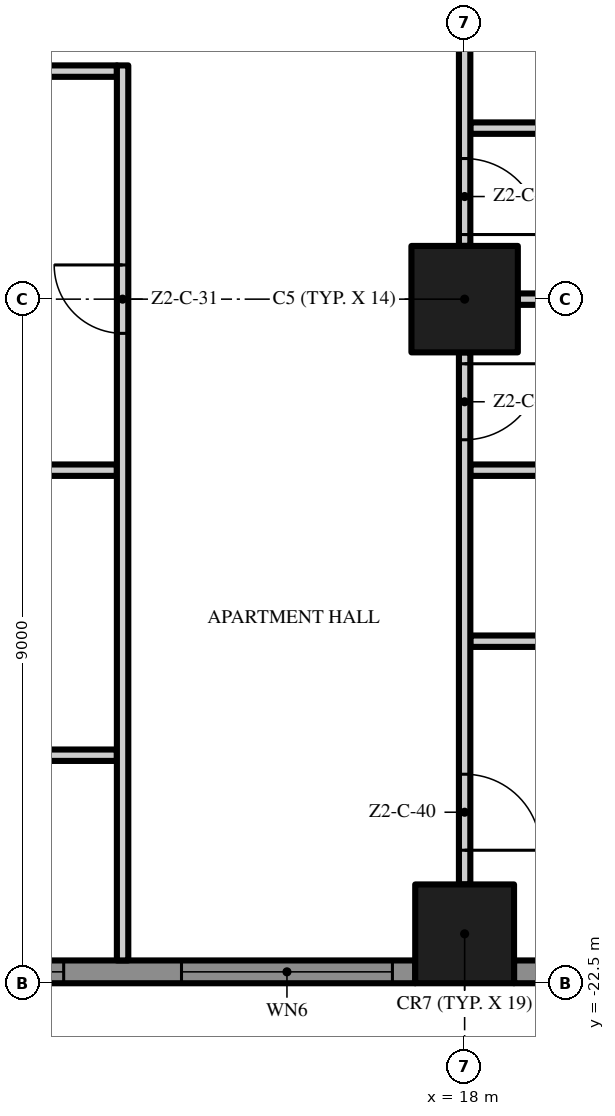
"""IFC4 building model, lengths in metres.
Left out: names, types, materials, properties, quantities, classifications, styles, units other than length and angle.
Written with IfcOpenShell. Run it as: python <this file> out.ifc"""

import sys

from ifc_helpers import new_model, si_unit, direction, frame, frame_2d, origin, origin_2d, place, context, subcontext, project, spatial, polyline, rectangle, outline, extrude, element, fill, save


model = new_model("IFC4")
c1 = context("Model", 3, precision=1e-05, world=origin(), true_north=direction((0.0, 1.0)))
c2 = subcontext(c1, "Body", "Model", "MODEL_VIEW")
j1 = project(units=[si_unit("LENGTHUNIT", "METRE"), si_unit("PLANEANGLEUNIT", "RADIAN")], contexts=[c1])
p1 = place(None, origin())
s1 = spatial("IfcSite", under=j1, at=p1, CompositionType="ELEMENT")
p2 = place(p1, origin())
s2 = spatial("IfcBuilding", under=s1, at=p2, CompositionType="ELEMENT")
p3 = place(p2, frame((0.0, 0.0, 92.2)))
s3 = spatial("IfcBuildingStorey", under=s2, at=p3, CompositionType="ELEMENT", Elevation=92.2)
p4 = place(p3, frame((18.0, -13.5, 0.0), z_axis=(0.0, 0.0, 1.0), x_axis=(1.0, 0.0, 0.0)))
e1 = element("IfcColumn", 1, at=p4, inside=s3, PredefinedType="COLUMN", context=c2, shape_type="SweptSolid", body=[
    extrude(rectangle(XDim=1.4, YDim=1.4, at=origin_2d()), origin(), (0.0, 0.0, 1.0), 3.5),
])
p5 = place(p3, frame((18.0, -21.85, 0.0), z_axis=(0.0, 0.0, 1.0), x_axis=(1.0, 0.0, 0.0)))
e2 = element("IfcColumn", 2, at=p5, inside=s3, PredefinedType="COLUMN", context=c2, shape_type="SweptSolid", body=[
    extrude(rectangle(XDim=1.3, YDim=1.3, at=origin_2d()), origin(), (0.0, 0.0, 1.0), 3.5),
])
p6 = place(p3, frame((17.35, -22.35, 0.0), z_axis=(0.0, 0.0, 1.0), x_axis=(-1.0, 0.0, 0.0)))
e3 = element("IfcWall", 3, at=p6, inside=s3, PredefinedType="SOLIDWALL", context=c2, shape_type="SweptSolid", body=[
    extrude(rectangle(XDim=7.7, YDim=0.3, at=frame_2d((3.85, 0.0))), origin(), (0.0, 0.0, 1.0), 3.5),
])
p7 = place(p6, frame((4.625, 0.0, 0.45)))
e4 = element("IfcOpeningElement", 4, at=p7, cuts=e3, PredefinedType="OPENING", context=c2, shape_type="SweptSolid", body=[
    extrude(rectangle(XDim=2.775, YDim=2.65, at=frame_2d((1.387, 1.325))), frame((0.0, 0.16, 0.0), z_axis=(0.0, -1.0, 0.0), x_axis=(1.0, 0.0, 0.0)), (0.0, 0.0, 1.0), 0.32),
])
p8 = place(p6, frame((0.3, 0.0, 0.45)))
e5 = element("IfcOpeningElement", 5, at=p8, cuts=e3, PredefinedType="OPENING", context=c2, shape_type="SweptSolid", body=[
    extrude(rectangle(XDim=2.775, YDim=2.65, at=frame_2d((1.387, 1.325))), frame((0.0, 0.16, 0.0), z_axis=(0.0, -1.0, 0.0), x_axis=(1.0, 0.0, 0.0)), (0.0, 0.0, 1.0), 0.32),
])
p9 = place(p3, frame((22.5, -22.35, 0.0), z_axis=(0.0, 0.0, 1.0), x_axis=(-1.0, 0.0, 0.0)))
e6 = element("IfcWall", 6, at=p9, inside=s3, PredefinedType="SOLIDWALL", context=c2, shape_type="SweptSolid", body=[
    extrude(rectangle(XDim=3.85, YDim=0.3, at=frame_2d((1.925, 0.0))), origin(), (0.0, 0.0, 1.0), 3.5),
])
p10 = place(p9, frame((0.775, 0.0, 0.0)))
e7 = element("IfcOpeningElement", 7, at=p10, cuts=e6, PredefinedType="OPENING", context=c2, shape_type="SweptSolid", body=[
    extrude(rectangle(XDim=2.775, YDim=2.4, at=frame_2d((1.387, 1.2))), frame((0.0, 0.16, 0.0), z_axis=(0.0, -1.0, 0.0), x_axis=(1.0, 0.0, 0.0)), (0.0, 0.0, 1.0), 0.32),
])
p11 = place(p3, origin())
e8 = element("IfcWall", 8, at=p11, inside=s3, PredefinedType="USERDEFINED", context=c2, shape_type="SweptSolid", body=[
    extrude(outline(polyline([(-22.5, -24.3), (-21.0, -23.595), (-19.5, -23.159), (-18.75, -23.1), (-18.0, -23.159), (-16.5, -23.595), (-15.0, -24.3), (-13.5, -25.005), (-12.0, -25.441), (-11.25, -25.5), (-10.5, -25.441), (-9.0, -25.005), (-7.5, -24.3), (-6.0, -23.595), (-4.5, -23.159), (-3.75, -23.1), (-3.0, -23.159), (-1.5, -23.595), (0.0, -24.3), (1.5, -25.005), (3.0, -25.441), (3.75, -25.5), (4.5, -25.441), (6.0, -25.005), (7.5, -24.3), (9.0, -23.595), (10.5, -23.159), (11.25, -23.1), (12.0, -23.159), (13.5, -23.595), (15.0, -24.3), (16.5, -25.005), (18.0, -25.441), (18.75, -25.5), (19.5, -25.441), (21.0, -25.005), (22.5, -24.3), (22.394, -24.074), (20.911, -24.771), (19.455, -25.194), (18.75, -25.249), (18.045, -25.194), (16.589, -24.771), (15.106, -24.074), (13.589, -23.36), (12.045, -22.911), (11.25, -22.849), (10.455, -22.911), (8.911, -23.36), (7.394, -24.074), (5.911, -24.771), (4.455, -25.194), (3.75, -25.249), (3.045, -25.194), (1.589, -24.771), (0.106, -24.074), (-1.411, -23.36), (-2.955, -22.911), (-3.75, -22.849), (-4.545, -22.911), (-6.089, -23.36), (-7.606, -24.074), (-9.089, -24.771), (-10.545, -25.194), (-11.25, -25.249), (-11.955, -25.194), (-13.411, -24.771), (-14.894, -24.074), (-16.411, -23.36), (-17.955, -22.911), (-18.75, -22.849), (-19.545, -22.911), (-21.089, -23.36), (-22.606, -24.074), (-22.5, -24.3)])), origin(), (0.0, 0.0, 1.0), 0.9),
])
p12 = place(p3, frame((9.075, -19.5, 0.0), z_axis=(0.0, 0.0, 1.0), x_axis=(1.0, 0.0, 0.0)))
e9 = element("IfcWall", 9, at=p12, inside=s3, PredefinedType="PARTITIONING", context=c2, shape_type="SweptSolid", body=[
    extrude(rectangle(XDim=4.35, YDim=0.15, at=frame_2d((2.175, 0.0))), origin(), (0.0, 0.0, 1.0), 3.5),
])
p13 = place(p3, frame((18.075, -18.0, 0.0), z_axis=(0.0, 0.0, 1.0), x_axis=(1.0, 0.0, 0.0)))
e10 = element("IfcWall", 10, at=p13, inside=s3, PredefinedType="PARTITIONING", context=c2, shape_type="SweptSolid", body=[
    extrude(rectangle(XDim=3.775, YDim=0.15, at=frame_2d((1.887, 0.0))), origin(), (0.0, 0.0, 1.0), 3.5),
])
p14 = place(p3, frame((13.425, -15.75, 0.0), z_axis=(0.0, 0.0, 1.0), x_axis=(-1.0, 0.0, 0.0)))
e11 = element("IfcWall", 11, at=p14, inside=s3, PredefinedType="PARTITIONING", context=c2, shape_type="SweptSolid", body=[
    extrude(rectangle(XDim=4.35, YDim=0.15, at=frame_2d((2.175, 0.0))), origin(), (0.0, 0.0, 1.0), 3.5),
])
p15 = place(p14, frame((1.7, 0.0, 0.0)))
e12 = element("IfcOpeningElement", 12, at=p15, cuts=e11, PredefinedType="OPENING", context=c2, shape_type="SweptSolid", body=[
    extrude(rectangle(XDim=0.9, YDim=2.1, at=frame_2d((0.45, 1.05))), frame((0.0, 0.085, 0.0), z_axis=(0.0, -1.0, 0.0), x_axis=(1.0, 0.0, 0.0)), (0.0, 0.0, 1.0), 0.17),
])
p16 = place(p3, frame((18.075, -15.75, 0.0), z_axis=(0.0, 0.0, 1.0), x_axis=(1.0, 0.0, 0.0)))
e13 = element("IfcWall", 13, at=p16, inside=s3, PredefinedType="PARTITIONING", context=c2, shape_type="SweptSolid", body=[
    extrude(rectangle(XDim=2.85, YDim=0.15, at=frame_2d((1.425, 0.0))), origin(), (0.0, 0.0, 1.0), 3.5),
])
p17 = place(p3, frame((18.7, -13.5, 0.0), z_axis=(0.0, 0.0, 1.0), x_axis=(1.0, 0.0, 0.0)))
e14 = element("IfcWall", 14, at=p17, inside=s3, PredefinedType="PARTITIONING", context=c2, shape_type="SweptSolid", body=[
    extrude(rectangle(XDim=7.0, YDim=0.15, at=frame_2d((3.5, 0.0))), origin(), (0.0, 0.0, 1.0), 3.5),
])
p18 = place(p3, frame((18.075, -11.25, 0.0), z_axis=(0.0, 0.0, 1.0), x_axis=(1.0, 0.0, 0.0)))
e15 = element("IfcWall", 15, at=p18, inside=s3, PredefinedType="PARTITIONING", context=c2, shape_type="SweptSolid", body=[
    extrude(rectangle(XDim=2.85, YDim=0.15, at=frame_2d((1.425, 0.0))), origin(), (0.0, 0.0, 1.0), 3.5),
])
p19 = place(p3, frame((9.075, -10.5, 0.0), z_axis=(0.0, 0.0, 1.0), x_axis=(1.0, 0.0, 0.0)))
e16 = element("IfcWall", 16, at=p19, inside=s3, PredefinedType="PARTITIONING", context=c2, shape_type="SweptSolid", body=[
    extrude(rectangle(XDim=4.35, YDim=0.15, at=frame_2d((2.175, 0.0))), origin(), (0.0, 0.0, 1.0), 3.5),
])
p20 = place(p3, frame((13.5, -22.2, 0.0), z_axis=(0.0, 0.0, 1.0), x_axis=(0.0, 1.0, 0.0)))
e17 = element("IfcWall", 17, at=p20, inside=s3, PredefinedType="PARTITIONING", context=c2, shape_type="SweptSolid", body=[
    extrude(rectangle(XDim=11.775, YDim=0.15, at=frame_2d((5.888, 0.0))), origin(), (0.0, 0.0, 1.0), 3.5),
])
p21 = place(p20, frame((8.25, 0.0, 0.0)))
e18 = element("IfcOpeningElement", 18, at=p21, cuts=e17, PredefinedType="OPENING", context=c2, shape_type="SweptSolid", body=[
    extrude(rectangle(XDim=0.9, YDim=2.1, at=frame_2d((0.45, 1.05))), frame((0.0, 0.085, 0.0), z_axis=(0.0, -1.0, 0.0), x_axis=(1.0, 0.0, 0.0)), (0.0, 0.0, 1.0), 0.17),
])
p22 = place(p3, frame((18.0, -14.2, 0.0), z_axis=(0.0, 0.0, 1.0), x_axis=(0.0, -1.0, 0.0)))
e19 = element("IfcWall", 19, at=p22, inside=s3, PredefinedType="PARTITIONING", context=c2, shape_type="SweptSolid", body=[
    extrude(rectangle(XDim=7.0, YDim=0.15, at=frame_2d((3.5, 0.0))), origin(), (0.0, 0.0, 1.0), 3.5),
])
p23 = place(p22, frame((0.15, 0.0, 0.0)))
e20 = element("IfcOpeningElement", 20, at=p23, cuts=e19, PredefinedType="OPENING", context=c2, shape_type="SweptSolid", body=[
    extrude(rectangle(XDim=1.0, YDim=2.4, at=frame_2d((0.5, 1.2))), frame((0.0, 0.085, 0.0), z_axis=(0.0, -1.0, 0.0), x_axis=(1.0, 0.0, 0.0)), (0.0, 0.0, 1.0), 0.17),
])
p24 = place(p22, frame((5.55, 0.0, 0.0)))
e21 = element("IfcOpeningElement", 21, at=p24, cuts=e19, PredefinedType="OPENING", context=c2, shape_type="SweptSolid", body=[
    extrude(rectangle(XDim=1.0, YDim=2.4, at=frame_2d((0.5, 1.2))), frame((0.0, 0.085, 0.0), z_axis=(0.0, -1.0, 0.0), x_axis=(1.0, 0.0, 0.0)), (0.0, 0.0, 1.0), 0.17),
])
p25 = place(p3, frame((18.0, -5.2, 0.0), z_axis=(0.0, 0.0, 1.0), x_axis=(0.0, -1.0, 0.0)))
e22 = element("IfcWall", 22, at=p25, inside=s3, PredefinedType="PARTITIONING", context=c2, shape_type="SweptSolid", body=[
    extrude(rectangle(XDim=7.6, YDim=0.15, at=frame_2d((3.8, 0.0))), origin(), (0.0, 0.0, 1.0), 3.5),
])
p26 = place(p25, frame((0.15, 0.0, 0.0)))
e23 = element("IfcOpeningElement", 23, at=p26, cuts=e22, PredefinedType="OPENING", context=c2, shape_type="SweptSolid", body=[
    extrude(rectangle(XDim=1.8, YDim=2.4, at=frame_2d((0.9, 1.2))), frame((0.0, 0.085, 0.0), z_axis=(0.0, -1.0, 0.0), x_axis=(1.0, 0.0, 0.0)), (0.0, 0.0, 1.0), 0.17),
])
p27 = place(p25, frame((6.45, 0.0, 0.0)))
e24 = element("IfcOpeningElement", 24, at=p27, cuts=e22, PredefinedType="OPENING", context=c2, shape_type="SweptSolid", body=[
    extrude(rectangle(XDim=1.0, YDim=2.4, at=frame_2d((0.5, 1.2))), frame((0.0, 0.085, 0.0), z_axis=(0.0, -1.0, 0.0), x_axis=(1.0, 0.0, 0.0)), (0.0, 0.0, 1.0), 0.17),
])
p28 = place(p7, origin())
e25 = element("IfcWindow", 25, at=p28, inside=s3, PartitioningType="SINGLE_PANEL", PredefinedType="WINDOW", context=c2, shape_type="SweptSolid", body=[
    extrude(rectangle(XDim=2.775, YDim=2.65, at=frame_2d((1.387, 1.325))), frame((0.0, 0.03, 0.0), z_axis=(0.0, -1.0, 0.0), x_axis=(1.0, 0.0, 0.0)), (0.0, 0.0, 1.0), 0.06),
])
fill(e4, e25)
p29 = place(p8, origin())
e26 = element("IfcWindow", 26, at=p29, inside=s3, PartitioningType="SINGLE_PANEL", PredefinedType="WINDOW", context=c2, shape_type="SweptSolid", body=[
    extrude(rectangle(XDim=2.775, YDim=2.65, at=frame_2d((1.387, 1.325))), frame((0.0, 0.03, 0.0), z_axis=(0.0, -1.0, 0.0), x_axis=(1.0, 0.0, 0.0)), (0.0, 0.0, 1.0), 0.06),
])
fill(e5, e26)
p30 = place(p21, origin())
e27 = element("IfcDoor", 27, at=p30, inside=s3, OperationType="SINGLE_SWING_RIGHT", PredefinedType="DOOR", context=c2, shape_type="SweptSolid", body=[
    extrude(rectangle(XDim=0.9, YDim=2.1, at=frame_2d((0.45, 1.05))), frame((0.0, 0.025, 0.0), z_axis=(0.0, -1.0, 0.0), x_axis=(1.0, 0.0, 0.0)), (0.0, 0.0, 1.0), 0.05),
])
fill(e18, e27)
p31 = place(p27, origin())
e28 = element("IfcDoor", 28, at=p31, inside=s3, OperationType="SINGLE_SWING_RIGHT", PredefinedType="DOOR", context=c2, shape_type="SweptSolid", body=[
    extrude(rectangle(XDim=1.0, YDim=2.4, at=frame_2d((0.5, 1.2))), frame((0.0, 0.025, 0.0), z_axis=(0.0, -1.0, 0.0), x_axis=(1.0, 0.0, 0.0)), (0.0, 0.0, 1.0), 0.05),
])
fill(e24, e28)
p32 = place(p23, origin())
e29 = element("IfcDoor", 29, at=p32, inside=s3, OperationType="SINGLE_SWING_LEFT", PredefinedType="DOOR", context=c2, shape_type="SweptSolid", body=[
    extrude(rectangle(XDim=1.0, YDim=2.4, at=frame_2d((0.5, 1.2))), frame((0.0, 0.025, 0.0), z_axis=(0.0, -1.0, 0.0), x_axis=(1.0, 0.0, 0.0)), (0.0, 0.0, 1.0), 0.05),
])
fill(e20, e29)
p33 = place(p24, origin())
e30 = element("IfcDoor", 30, at=p33, inside=s3, OperationType="SINGLE_SWING_RIGHT", PredefinedType="DOOR", context=c2, shape_type="SweptSolid", body=[
    extrude(rectangle(XDim=1.0, YDim=2.4, at=frame_2d((0.5, 1.2))), frame((0.0, 0.025, 0.0), z_axis=(0.0, -1.0, 0.0), x_axis=(1.0, 0.0, 0.0)), (0.0, 0.0, 1.0), 0.05),
])
fill(e21, e30)
save(model, sys.argv[1])
